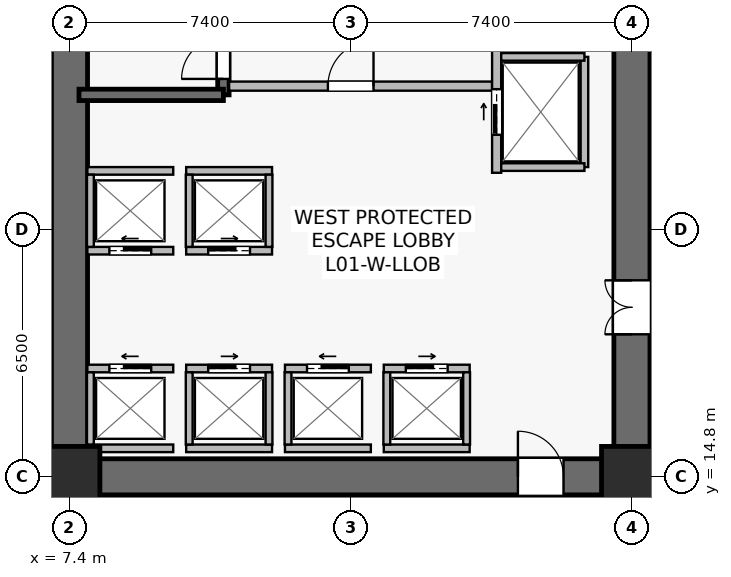
"""IFC4 building model, lengths in metres.
Left out: names, types, materials, properties, quantities, classifications, styles, units other than length and angle.
Written with IfcOpenShell. Run it as: python <this file> out.ifc"""

import sys

from ifc_helpers import new_model, si_unit, direction, frame, frame_2d, origin, origin_2d, place, context, subcontext, project, spatial, rectangle, extrude, source, transform, mapped, element, fill, save


model = new_model("IFC4")
c1 = context("Model", 3, precision=1e-05, world=origin(), true_north=direction((0.0, 1.0)))
c2 = subcontext(c1, "Body", "Model", "MODEL_VIEW")
j1 = project(units=[si_unit("LENGTHUNIT", "METRE"), si_unit("PLANEANGLEUNIT", "RADIAN")], contexts=[c1])
p1 = place(None, origin())
s1 = spatial("IfcSite", under=j1, at=p1, CompositionType="ELEMENT")
p2 = place(p1, origin())
s2 = spatial("IfcBuilding", under=s1, at=p2, CompositionType="ELEMENT")
p3 = place(p2, origin())
s3 = spatial("IfcBuildingStorey", under=s2, at=p3, CompositionType="ELEMENT", Elevation=0.0)
p4 = place(p3, frame((6.925, 14.8, 0.0), z_axis=(0.0, 0.0, 1.0), x_axis=(1.0, 0.0, 0.0)))
e1 = element("IfcWall", 1, at=p4, inside=s3, PredefinedType="SHEAR", context=c2, shape_type="SweptSolid", body=[
    extrude(rectangle(XDim=15.75, YDim=0.95, at=frame_2d((7.875, 0.0))), origin(), (0.0, 0.0, 1.0), 5.05),
])
p5 = place(p4, frame((12.275, 0.0, 0.0)))
e2 = element("IfcOpeningElement", 2, at=p5, cuts=e1, PredefinedType="OPENING", context=c2, shape_type="SweptSolid", body=[
    extrude(rectangle(XDim=1.2, YDim=2.16, at=frame_2d((0.6, 1.08))), frame((0.0, 0.485, 0.0), z_axis=(0.0, -1.0, 0.0), x_axis=(1.0, 0.0, 0.0)), (0.0, 0.0, 1.0), 0.97),
])
p6 = place(p3, frame((7.4, 15.275, 0.0), z_axis=(0.0, 0.0, 1.0), x_axis=(0.0, 1.0, 0.0)))
e3 = element("IfcWall", 3, at=p6, inside=s3, PredefinedType="SHEAR", context=c2, shape_type="SweptSolid", body=[
    extrude(rectangle(XDim=18.05, YDim=0.95, at=frame_2d((9.025, 0.0))), origin(), (0.0, 0.0, 1.0), 5.05),
])
p7 = place(p3, frame((22.2, 15.275, 0.0), z_axis=(0.0, 0.0, 1.0), x_axis=(0.0, 1.0, 0.0)))
e4 = element("IfcWall", 4, at=p7, inside=s3, PredefinedType="SHEAR", context=c2, shape_type="SweptSolid", body=[
    extrude(rectangle(XDim=18.05, YDim=0.95, at=frame_2d((9.025, 0.0))), origin(), (0.0, 0.0, 1.0), 5.05),
])
p8 = place(p7, frame((3.275, 0.0, 0.0)))
e5 = element("IfcOpeningElement", 5, at=p8, cuts=e4, PredefinedType="OPENING", context=c2, shape_type="SweptSolid", body=[
    extrude(rectangle(XDim=1.42, YDim=2.2, at=frame_2d((0.71, 1.1))), frame((0.0, 0.485, 0.0), z_axis=(0.0, -1.0, 0.0), x_axis=(1.0, 0.0, 0.0)), (0.0, 0.0, 1.0), 0.97),
])
p9 = place(p3, frame((11.45, 24.85, 0.0), z_axis=(0.0, 0.0, 1.0), x_axis=(0.0, 1.0, 0.0)))
e6 = element("IfcWall", 6, at=p9, inside=s3, PredefinedType="SHEAR", context=c2, shape_type="SweptSolid", body=[
    extrude(rectangle(XDim=8.63, YDim=0.3, at=frame_2d((4.315, 0.0))), origin(), (0.0, 0.0, 1.0), 5.05),
])
p10 = place(p9, frame((0.42, 0.0, 0.0)))
e7 = element("IfcOpeningElement", 7, at=p10, cuts=e6, PredefinedType="OPENING", context=c2, shape_type="SweptSolid", body=[
    extrude(rectangle(XDim=1.1, YDim=2.15, at=frame_2d((0.55, 1.075))), frame((0.0, 0.16, 0.0), z_axis=(0.0, -1.0, 0.0), x_axis=(1.0, 0.0, 0.0)), (0.0, 0.0, 1.0), 0.32),
])
p11 = place(p3, frame((7.65, 24.85, 0.0), z_axis=(0.0, 0.0, 1.0), x_axis=(1.0, 0.0, 0.0)))
e8 = element("IfcWall", 8, at=p11, inside=s3, PredefinedType="SHEAR", context=c2, shape_type="SweptSolid", body=[
    extrude(rectangle(XDim=3.8, YDim=0.3, at=frame_2d((1.9, 0.0))), origin(), (0.0, 0.0, 1.0), 5.05),
])
m1 = source(origin(), c2, "Body", "SweptSolid", [
    extrude(rectangle(XDim=1.6, YDim=1.6, at=origin_2d()), origin(), (0.0, 0.0, 1.0), 5.4),
])
for number, where, z_axis, x_axis in (
    (9, (7.4, 14.8, 0.0), (0.0, 0.0, 1.0), (1.0, 0.0, 0.0)),
    (10, (22.2, 14.8, 0.0), (0.0, 0.0, 1.0), (1.0, 0.0, 0.0)),
):
    element("IfcColumn", number, at=place(p3, frame(where, z_axis=z_axis, x_axis=x_axis)), inside=s3, PredefinedType="COLUMN", context=c2, shape_type="MappedRepresentation", body=[
        mapped(m1, transform((0.0, 0.0, 0.0), scale=1.0)),
    ])
p12 = place(p3, frame((11.6, 25.08, 0.0), z_axis=(0.0, 0.0, 1.0), x_axis=(1.0, 0.0, 0.0)))
e11 = element("IfcWall", 11, at=p12, inside=s3, PredefinedType="SOLIDWALL", context=c2, shape_type="SweptSolid", body=[
    extrude(rectangle(XDim=6.92, YDim=0.24, at=frame_2d((3.46, 0.0))), origin(), (0.0, 0.0, 1.0), 4.335),
])
p13 = place(p12, frame((2.6, 0.0, 0.0)))
e12 = element("IfcOpeningElement", 12, at=p13, cuts=e11, PredefinedType="OPENING", context=c2, shape_type="SweptSolid", body=[
    extrude(rectangle(XDim=1.2, YDim=2.16, at=frame_2d((0.6, 1.08))), frame((0.0, 0.13, 0.0), z_axis=(0.0, -1.0, 0.0), x_axis=(1.0, 0.0, 0.0)), (0.0, 0.0, 1.0), 0.26),
])
p14 = place(p3, frame((18.64, 22.8, 0.0), z_axis=(0.0, 0.0, 1.0), x_axis=(0.0, 1.0, 0.0)))
e13 = element("IfcWall", 13, at=p14, inside=s3, PredefinedType="SOLIDWALL", context=c2, shape_type="SweptSolid", body=[
    extrude(rectangle(XDim=6.85, YDim=0.24, at=frame_2d((3.425, 0.0))), origin(), (0.0, 0.0, 1.0), 4.135),
])
p15 = place(p14, frame((4.85, 0.0, 0.0)))
e14 = element("IfcOpeningElement", 14, at=p15, cuts=e13, PredefinedType="OPENING", context=c2, shape_type="SweptSolid", body=[
    extrude(rectangle(XDim=1.1, YDim=2.22, at=frame_2d((0.55, 1.11))), frame((0.0, 0.13, 0.0), z_axis=(0.0, -1.0, 0.0), x_axis=(1.0, 0.0, 0.0)), (0.0, 0.0, 1.0), 0.26),
])
p16 = place(p14, frame((1.0, 0.0, 0.0)))
e15 = element("IfcOpeningElement", 15, at=p16, cuts=e13, PredefinedType="OPENING", context=c2, shape_type="SweptSolid", body=[
    extrude(rectangle(XDim=1.2, YDim=2.22, at=frame_2d((0.6, 1.11))), frame((0.0, 0.13, 0.0), z_axis=(0.0, -1.0, 0.0), x_axis=(1.0, 0.0, 0.0)), (0.0, 0.0, 1.0), 0.26),
])
p17 = place(p3, frame((7.87, 17.65, 0.0), z_axis=(0.0, 0.0, 1.0), x_axis=(1.0, 0.0, 0.0)))
e16 = element("IfcWall", 16, at=p17, inside=s3, PredefinedType="SOLIDWALL", context=c2, shape_type="SweptSolid", body=[
    extrude(rectangle(XDim=2.26, YDim=0.2, at=frame_2d((1.13, 0.0))), origin(), (0.0, 0.0, 1.0), 5.05),
])
p18 = place(p17, frame((0.58, 0.0, 0.0)))
e17 = element("IfcOpeningElement", 17, at=p18, cuts=e16, PredefinedType="OPENING", context=c2, shape_type="SweptSolid", body=[
    extrude(rectangle(XDim=1.1, YDim=2.22, at=frame_2d((0.55, 1.11))), frame((0.0, 0.11, 0.0), z_axis=(0.0, -1.0, 0.0), x_axis=(1.0, 0.0, 0.0)), (0.0, 0.0, 1.0), 0.22),
])
p19 = place(p3, frame((7.87, 15.55, 0.0), z_axis=(0.0, 0.0, 1.0), x_axis=(1.0, 0.0, 0.0)))
e18 = element("IfcWall", 18, at=p19, inside=s3, PredefinedType="SOLIDWALL", context=c2, shape_type="SweptSolid", body=[
    extrude(rectangle(XDim=2.26, YDim=0.2, at=frame_2d((1.13, 0.0))), origin(), (0.0, 0.0, 1.0), 5.05),
])
p20 = place(p3, frame((7.95, 15.65, 0.0), z_axis=(0.0, 0.0, 1.0), x_axis=(0.0, 1.0, 0.0)))
e19 = element("IfcWall", 19, at=p20, inside=s3, PredefinedType="SOLIDWALL", context=c2, shape_type="SweptSolid", body=[
    extrude(rectangle(XDim=1.9, YDim=0.18, at=frame_2d((0.95, 0.0))), origin(), (0.0, 0.0, 1.0), 5.05),
])
p21 = place(p3, frame((10.47, 17.65, 0.0), z_axis=(0.0, 0.0, 1.0), x_axis=(1.0, 0.0, 0.0)))
e20 = element("IfcWall", 20, at=p21, inside=s3, PredefinedType="SOLIDWALL", context=c2, shape_type="SweptSolid", body=[
    extrude(rectangle(XDim=2.26, YDim=0.2, at=frame_2d((1.13, 0.0))), origin(), (0.0, 0.0, 1.0), 5.05),
])
p22 = place(p21, frame((0.58, 0.0, 0.0)))
e21 = element("IfcOpeningElement", 21, at=p22, cuts=e20, PredefinedType="OPENING", context=c2, shape_type="SweptSolid", body=[
    extrude(rectangle(XDim=1.1, YDim=2.22, at=frame_2d((0.55, 1.11))), frame((0.0, 0.11, 0.0), z_axis=(0.0, -1.0, 0.0), x_axis=(1.0, 0.0, 0.0)), (0.0, 0.0, 1.0), 0.22),
])
p23 = place(p3, frame((10.47, 15.55, 0.0), z_axis=(0.0, 0.0, 1.0), x_axis=(1.0, 0.0, 0.0)))
e22 = element("IfcWall", 22, at=p23, inside=s3, PredefinedType="SOLIDWALL", context=c2, shape_type="SweptSolid", body=[
    extrude(rectangle(XDim=2.26, YDim=0.2, at=frame_2d((1.13, 0.0))), origin(), (0.0, 0.0, 1.0), 5.05),
])
for number, where, z_axis, x_axis in (
    (23, (10.55, 15.65, 0.0), (0.0, 0.0, 1.0), (0.0, 1.0, 0.0)),
    (24, (12.65, 15.65, 0.0), (0.0, 0.0, 1.0), (0.0, 1.0, 0.0)),
):
    element("IfcWall", number, at=place(p3, frame(where, z_axis=z_axis, x_axis=x_axis)), inside=s3, PredefinedType="SOLIDWALL", context=c2, shape_type="SweptSolid", body=[
        extrude(rectangle(XDim=1.9, YDim=0.18, at=frame_2d((0.95, 0.0))), origin(), (0.0, 0.0, 1.0), 5.05),
    ])
p24 = place(p3, frame((13.07, 17.65, 0.0), z_axis=(0.0, 0.0, 1.0), x_axis=(1.0, 0.0, 0.0)))
e25 = element("IfcWall", 25, at=p24, inside=s3, PredefinedType="SOLIDWALL", context=c2, shape_type="SweptSolid", body=[
    extrude(rectangle(XDim=2.26, YDim=0.2, at=frame_2d((1.13, 0.0))), origin(), (0.0, 0.0, 1.0), 4.335),
])
p25 = place(p24, frame((0.58, 0.0, 0.0)))
e26 = element("IfcOpeningElement", 26, at=p25, cuts=e25, PredefinedType="OPENING", context=c2, shape_type="SweptSolid", body=[
    extrude(rectangle(XDim=1.1, YDim=2.22, at=frame_2d((0.55, 1.11))), frame((0.0, 0.11, 0.0), z_axis=(0.0, -1.0, 0.0), x_axis=(1.0, 0.0, 0.0)), (0.0, 0.0, 1.0), 0.22),
])
p26 = place(p3, frame((13.07, 15.55, 0.0), z_axis=(0.0, 0.0, 1.0), x_axis=(1.0, 0.0, 0.0)))
e27 = element("IfcWall", 27, at=p26, inside=s3, PredefinedType="SOLIDWALL", context=c2, shape_type="SweptSolid", body=[
    extrude(rectangle(XDim=2.26, YDim=0.2, at=frame_2d((1.13, 0.0))), origin(), (0.0, 0.0, 1.0), 4.335),
])
p27 = place(p3, frame((13.15, 15.65, 0.0), z_axis=(0.0, 0.0, 1.0), x_axis=(0.0, 1.0, 0.0)))
e28 = element("IfcWall", 28, at=p27, inside=s3, PredefinedType="SOLIDWALL", context=c2, shape_type="SweptSolid", body=[
    extrude(rectangle(XDim=1.9, YDim=0.18, at=frame_2d((0.95, 0.0))), origin(), (0.0, 0.0, 1.0), 5.05),
])
p28 = place(p3, frame((15.67, 17.65, 0.0), z_axis=(0.0, 0.0, 1.0), x_axis=(1.0, 0.0, 0.0)))
e29 = element("IfcWall", 29, at=p28, inside=s3, PredefinedType="SOLIDWALL", context=c2, shape_type="SweptSolid", body=[
    extrude(rectangle(XDim=2.26, YDim=0.2, at=frame_2d((1.13, 0.0))), origin(), (0.0, 0.0, 1.0), 5.05),
])
p29 = place(p28, frame((0.58, 0.0, 0.0)))
e30 = element("IfcOpeningElement", 30, at=p29, cuts=e29, PredefinedType="OPENING", context=c2, shape_type="SweptSolid", body=[
    extrude(rectangle(XDim=1.1, YDim=2.22, at=frame_2d((0.55, 1.11))), frame((0.0, 0.11, 0.0), z_axis=(0.0, -1.0, 0.0), x_axis=(1.0, 0.0, 0.0)), (0.0, 0.0, 1.0), 0.22),
])
p30 = place(p3, frame((15.67, 15.55, 0.0), z_axis=(0.0, 0.0, 1.0), x_axis=(1.0, 0.0, 0.0)))
e31 = element("IfcWall", 31, at=p30, inside=s3, PredefinedType="SOLIDWALL", context=c2, shape_type="SweptSolid", body=[
    extrude(rectangle(XDim=2.26, YDim=0.2, at=frame_2d((1.13, 0.0))), origin(), (0.0, 0.0, 1.0), 5.05),
])
for number, where, z_axis, x_axis in (
    (32, (15.75, 15.65, 0.0), (0.0, 0.0, 1.0), (0.0, 1.0, 0.0)),
    (33, (17.85, 15.65, 0.0), (0.0, 0.0, 1.0), (0.0, 1.0, 0.0)),
):
    element("IfcWall", number, at=place(p3, frame(where, z_axis=z_axis, x_axis=x_axis)), inside=s3, PredefinedType="SOLIDWALL", context=c2, shape_type="SweptSolid", body=[
        extrude(rectangle(XDim=1.9, YDim=0.18, at=frame_2d((0.95, 0.0))), origin(), (0.0, 0.0, 1.0), 5.05),
    ])
p31 = place(p3, frame((7.87, 20.75, 0.0), z_axis=(0.0, 0.0, 1.0), x_axis=(1.0, 0.0, 0.0)))
e34 = element("IfcWall", 34, at=p31, inside=s3, PredefinedType="SOLIDWALL", context=c2, shape_type="SweptSolid", body=[
    extrude(rectangle(XDim=2.26, YDim=0.2, at=frame_2d((1.13, 0.0))), origin(), (0.0, 0.0, 1.0), 5.05),
])
p32 = place(p31, frame((0.58, 0.0, 0.0)))
e35 = element("IfcOpeningElement", 35, at=p32, cuts=e34, PredefinedType="OPENING", context=c2, shape_type="SweptSolid", body=[
    extrude(rectangle(XDim=1.1, YDim=2.22, at=frame_2d((0.55, 1.11))), frame((0.0, 0.11, 0.0), z_axis=(0.0, -1.0, 0.0), x_axis=(1.0, 0.0, 0.0)), (0.0, 0.0, 1.0), 0.22),
])
p33 = place(p3, frame((7.87, 22.85, 0.0), z_axis=(0.0, 0.0, 1.0), x_axis=(1.0, 0.0, 0.0)))
e36 = element("IfcWall", 36, at=p33, inside=s3, PredefinedType="SOLIDWALL", context=c2, shape_type="SweptSolid", body=[
    extrude(rectangle(XDim=2.26, YDim=0.2, at=frame_2d((1.13, 0.0))), origin(), (0.0, 0.0, 1.0), 5.05),
])
p34 = place(p3, frame((7.95, 20.85, 0.0), z_axis=(0.0, 0.0, 1.0), x_axis=(0.0, 1.0, 0.0)))
e37 = element("IfcWall", 37, at=p34, inside=s3, PredefinedType="SOLIDWALL", context=c2, shape_type="SweptSolid", body=[
    extrude(rectangle(XDim=1.9, YDim=0.18, at=frame_2d((0.95, 0.0))), origin(), (0.0, 0.0, 1.0), 5.05),
])
p35 = place(p3, frame((10.47, 20.75, 0.0), z_axis=(0.0, 0.0, 1.0), x_axis=(1.0, 0.0, 0.0)))
e38 = element("IfcWall", 38, at=p35, inside=s3, PredefinedType="SOLIDWALL", context=c2, shape_type="SweptSolid", body=[
    extrude(rectangle(XDim=2.26, YDim=0.2, at=frame_2d((1.13, 0.0))), origin(), (0.0, 0.0, 1.0), 5.05),
])
p36 = place(p35, frame((0.58, 0.0, 0.0)))
e39 = element("IfcOpeningElement", 39, at=p36, cuts=e38, PredefinedType="OPENING", context=c2, shape_type="SweptSolid", body=[
    extrude(rectangle(XDim=1.1, YDim=2.22, at=frame_2d((0.55, 1.11))), frame((0.0, 0.11, 0.0), z_axis=(0.0, -1.0, 0.0), x_axis=(1.0, 0.0, 0.0)), (0.0, 0.0, 1.0), 0.22),
])
p37 = place(p3, frame((10.47, 22.85, 0.0), z_axis=(0.0, 0.0, 1.0), x_axis=(1.0, 0.0, 0.0)))
e40 = element("IfcWall", 40, at=p37, inside=s3, PredefinedType="SOLIDWALL", context=c2, shape_type="SweptSolid", body=[
    extrude(rectangle(XDim=2.26, YDim=0.2, at=frame_2d((1.13, 0.0))), origin(), (0.0, 0.0, 1.0), 5.05),
])
for number, where, z_axis, x_axis in (
    (41, (10.55, 20.85, 0.0), (0.0, 0.0, 1.0), (0.0, 1.0, 0.0)),
    (42, (12.65, 20.85, 0.0), (0.0, 0.0, 1.0), (0.0, 1.0, 0.0)),
):
    element("IfcWall", number, at=place(p3, frame(where, z_axis=z_axis, x_axis=x_axis)), inside=s3, PredefinedType="SOLIDWALL", context=c2, shape_type="SweptSolid", body=[
        extrude(rectangle(XDim=1.9, YDim=0.18, at=frame_2d((0.95, 0.0))), origin(), (0.0, 0.0, 1.0), 5.05),
    ])
p38 = place(p3, frame((20.95, 22.95, 0.0), z_axis=(0.0, 0.0, 1.0), x_axis=(0.0, 1.0, 0.0)))
e43 = element("IfcWall", 43, at=p38, inside=s3, PredefinedType="SOLIDWALL", context=c2, shape_type="SweptSolid", body=[
    extrude(rectangle(XDim=2.9, YDim=0.2, at=frame_2d((1.45, 0.0))), origin(), (0.0, 0.0, 1.0), 4.135),
])
for number, where, z_axis, x_axis in (
    (44, (18.76, 25.85, 0.0), (0.0, 0.0, 1.0), (1.0, 0.0, 0.0)),
    (45, (18.76, 22.95, 0.0), (0.0, 0.0, 1.0), (1.0, 0.0, 0.0)),
):
    element("IfcWall", number, at=place(p3, frame(where, z_axis=z_axis, x_axis=x_axis)), inside=s3, PredefinedType="SOLIDWALL", context=c2, shape_type="SweptSolid", body=[
        extrude(rectangle(XDim=2.19, YDim=0.2, at=frame_2d((1.095, 0.0))), origin(), (0.0, 0.0, 1.0), 5.05),
    ])
p39 = place(p3, frame((22.45, 14.4, 0.0), z_axis=(0.0, 0.0, 1.0), x_axis=(0.0, -1.0, 0.0)))
e46 = element("IfcWall", 46, at=p39, inside=s3, PredefinedType="SOLIDWALL", context=c2, shape_type="SweptSolid", body=[
    extrude(rectangle(XDim=15.05, YDim=0.2, at=frame_2d((7.525, 0.0))), origin(), (0.0, 0.0, 1.0), 4.335),
])
p40 = place(p39, frame((3.43, 0.0, 0.0)))
e47 = element("IfcOpeningElement", 47, at=p40, cuts=e46, PredefinedType="OPENING", context=c2, shape_type="SweptSolid", body=[
    extrude(rectangle(XDim=1.42, YDim=2.2, at=frame_2d((0.71, 1.1))), frame((0.0, 0.11, 0.0), z_axis=(0.0, -1.0, 0.0), x_axis=(1.0, 0.0, 0.0)), (0.0, 0.0, 1.0), 0.22),
])
m2 = source(origin(), c2, "Body", "SweptSolid", [
    extrude(rectangle(XDim=1.1, YDim=2.15, at=frame_2d((0.55, 1.075))), frame((0.0, 0.025, 0.0), z_axis=(0.0, -1.0, 0.0), x_axis=(1.0, 0.0, 0.0)), (0.0, 0.0, 1.0), 0.05),
])
p41 = place(p10, origin())
e48 = element("IfcDoor", 48, at=p41, inside=s3, OperationType="SINGLE_SWING_LEFT", PredefinedType="DOOR", context=c2, shape_type="MappedRepresentation", body=[
    mapped(m2, transform((0.0, 0.0, 0.0), scale=1.0)),
])
fill(e7, e48)
m3 = source(origin(), c2, "Body", "SweptSolid", [
    extrude(rectangle(XDim=1.2, YDim=2.16, at=frame_2d((0.6, 1.08))), frame((0.0, 0.025, 0.0), z_axis=(0.0, -1.0, 0.0), x_axis=(1.0, 0.0, 0.0)), (0.0, 0.0, 1.0), 0.05),
])
p42 = place(p13, origin())
e49 = element("IfcDoor", 49, at=p42, inside=s3, OperationType="SINGLE_SWING_RIGHT", PredefinedType="DOOR", context=c2, shape_type="MappedRepresentation", body=[
    mapped(m3, transform((0.0, 0.0, 0.0), scale=1.0)),
])
fill(e12, e49)
m4 = source(origin(), c2, "Body", "SweptSolid", [
    extrude(rectangle(XDim=1.1, YDim=2.22, at=frame_2d((0.55, 1.11))), frame((0.0, 0.025, 0.0), z_axis=(0.0, -1.0, 0.0), x_axis=(1.0, 0.0, 0.0)), (0.0, 0.0, 1.0), 0.05),
])
p43 = place(p18, origin())
e50 = element("IfcDoor", 50, at=p43, inside=s3, OperationType="SLIDING_TO_LEFT", PredefinedType="USERDEFINED", context=c2, shape_type="MappedRepresentation", body=[
    mapped(m4, transform((0.0, 0.0, 0.0), scale=1.0)),
])
fill(e17, e50)
p44 = place(p22, origin())
e51 = element("IfcDoor", 51, at=p44, inside=s3, OperationType="SLIDING_TO_RIGHT", PredefinedType="USERDEFINED", context=c2, shape_type="MappedRepresentation", body=[
    mapped(m4, transform((0.0, 0.0, 0.0), scale=1.0)),
])
fill(e21, e51)
p45 = place(p25, origin())
e52 = element("IfcDoor", 52, at=p45, inside=s3, OperationType="SLIDING_TO_LEFT", PredefinedType="USERDEFINED", context=c2, shape_type="MappedRepresentation", body=[
    mapped(m4, transform((0.0, 0.0, 0.0), scale=1.0)),
])
fill(e26, e52)
p46 = place(p29, origin())
e53 = element("IfcDoor", 53, at=p46, inside=s3, OperationType="SLIDING_TO_RIGHT", PredefinedType="USERDEFINED", context=c2, shape_type="MappedRepresentation", body=[
    mapped(m4, transform((0.0, 0.0, 0.0), scale=1.0)),
])
fill(e30, e53)
p47 = place(p32, origin())
e54 = element("IfcDoor", 54, at=p47, inside=s3, OperationType="SLIDING_TO_LEFT", PredefinedType="USERDEFINED", context=c2, shape_type="MappedRepresentation", body=[
    mapped(m4, transform((0.0, 0.0, 0.0), scale=1.0)),
])
fill(e35, e54)
p48 = place(p36, origin())
e55 = element("IfcDoor", 55, at=p48, inside=s3, OperationType="SLIDING_TO_RIGHT", PredefinedType="USERDEFINED", context=c2, shape_type="MappedRepresentation", body=[
    mapped(m4, transform((0.0, 0.0, 0.0), scale=1.0)),
])
fill(e39, e55)
m5 = source(origin(), c2, "Body", "SweptSolid", [
    extrude(rectangle(XDim=1.2, YDim=2.22, at=frame_2d((0.6, 1.11))), frame((0.0, 0.025, 0.0), z_axis=(0.0, -1.0, 0.0), x_axis=(1.0, 0.0, 0.0)), (0.0, 0.0, 1.0), 0.05),
])
p49 = place(p16, origin())
e56 = element("IfcDoor", 56, at=p49, inside=s3, OperationType="SLIDING_TO_RIGHT", PredefinedType="USERDEFINED", context=c2, shape_type="MappedRepresentation", body=[
    mapped(m5, transform((0.0, 0.0, 0.0), scale=1.0)),
])
fill(e15, e56)
p50 = place(p5, origin())
e57 = element("IfcDoor", 57, at=p50, inside=s3, OperationType="SINGLE_SWING_LEFT", PredefinedType="DOOR", context=c2, shape_type="MappedRepresentation", body=[
    mapped(m3, transform((0.0, 0.0, 0.0), scale=1.0)),
])
fill(e2, e57)
m6 = source(origin(), c2, "Body", "SweptSolid", [
    extrude(rectangle(XDim=1.42, YDim=2.2, at=frame_2d((0.71, 1.1))), frame((0.0, 0.025, 0.0), z_axis=(0.0, -1.0, 0.0), x_axis=(1.0, 0.0, 0.0)), (0.0, 0.0, 1.0), 0.05),
])
p51 = place(p8, origin())
e58 = element("IfcDoor", 58, at=p51, inside=s3, OperationType="DOUBLE_DOOR_SINGLE_SWING", PredefinedType="DOOR", context=c2, shape_type="MappedRepresentation", body=[
    mapped(m6, transform((0.0, 0.0, 0.0), scale=1.0)),
])
fill(e5, e58)
save(model, sys.argv[1])
